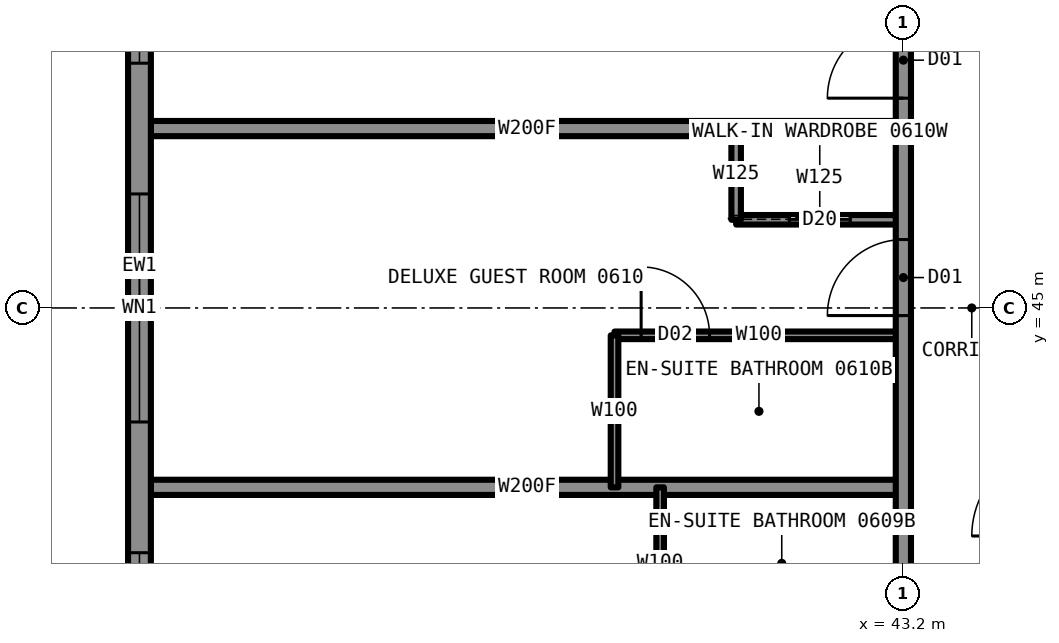
"""IFC4 building model, lengths in metres.
Left out: names, types, materials, properties, quantities, classifications, styles, units other than length and angle.
Written with IfcOpenShell. Run it as: python <this file> out.ifc"""

import sys

from ifc_helpers import new_model, si_unit, direction, frame, frame_2d, origin, place, context, subcontext, project, spatial, rectangle, extrude, element, fill, save


model = new_model("IFC4")
c1 = context("Model", 3, precision=1e-05, world=origin(), true_north=direction((0.0, 1.0)))
c2 = subcontext(c1, "Body", "Model", "MODEL_VIEW")
j1 = project(units=[si_unit("LENGTHUNIT", "METRE"), si_unit("PLANEANGLEUNIT", "RADIAN")], contexts=[c1])
p1 = place(None, origin())
s1 = spatial("IfcSite", under=j1, at=p1, CompositionType="ELEMENT")
p2 = place(p1, origin())
s2 = spatial("IfcBuilding", under=s1, at=p2, CompositionType="ELEMENT")
p3 = place(p2, frame((0.0, 0.0, 28.5)))
s3 = spatial("IfcBuildingStorey", under=s2, at=p3, CompositionType="ELEMENT", Elevation=28.5)
p4 = place(p3, frame((39.4, 44.64, 0.0), z_axis=(0.0, 0.0, 1.0), x_axis=(1.0, 0.0, 0.0)))
e1 = element("IfcWall", 1, at=p4, inside=s3, PredefinedType="PARTITIONING", context=c2, shape_type="SweptSolid", body=[
    extrude(rectangle(XDim=3.8, YDim=0.1, at=frame_2d((1.9, 0.0))), origin(), (0.0, 0.0, 1.0), 3.33),
])
p5 = place(p4, frame((0.35, 0.0, 0.0)))
e2 = element("IfcOpeningElement", 2, at=p5, cuts=e1, PredefinedType="OPENING", context=c2, shape_type="SweptSolid", body=[
    extrude(rectangle(XDim=0.9, YDim=2.1, at=frame_2d((0.45, 1.05))), frame((0.0, 0.06, 0.0), z_axis=(0.0, -1.0, 0.0), x_axis=(1.0, 0.0, 0.0)), (0.0, 0.0, 1.0), 0.12),
])
p6 = place(p3, frame((33.3, 42.64, 0.0), z_axis=(0.0, 0.0, 1.0), x_axis=(1.0, 0.0, 0.0)))
e3 = element("IfcWall", 3, at=p6, inside=s3, PredefinedType="PARTITIONING", context=c2, shape_type="SweptSolid", body=[
    extrude(rectangle(XDim=9.9, YDim=0.2, at=frame_2d((4.95, 0.0))), origin(), (0.0, 0.0, 1.0), 2.723),
])
p7 = place(p3, frame((41.0, 46.16, 0.0), z_axis=(0.0, 0.0, 1.0), x_axis=(1.0, 0.0, 0.0)))
e4 = element("IfcWall", 4, at=p7, inside=s3, PredefinedType="PARTITIONING", context=c2, shape_type="SweptSolid", body=[
    extrude(rectangle(XDim=2.2, YDim=0.125, at=frame_2d((1.1, 0.0))), origin(), (0.0, 0.0, 1.0), 3.33),
])
p8 = place(p7, frame((0.7, 0.0, 0.0)))
e5 = element("IfcOpeningElement", 5, at=p8, cuts=e4, PredefinedType="OPENING", context=c2, shape_type="SweptSolid", body=[
    extrude(rectangle(XDim=0.8, YDim=2.1, at=frame_2d((0.4, 1.05))), frame((0.0, 0.073, 0.0), z_axis=(0.0, -1.0, 0.0), x_axis=(1.0, 0.0, 0.0)), (0.0, 0.0, 1.0), 0.145),
])
p9 = place(p3, frame((33.3, 47.36, 0.0), z_axis=(0.0, 0.0, 1.0), x_axis=(1.0, 0.0, 0.0)))
e6 = element("IfcWall", 6, at=p9, inside=s3, PredefinedType="PARTITIONING", context=c2, shape_type="SweptSolid", body=[
    extrude(rectangle(XDim=9.9, YDim=0.2, at=frame_2d((4.95, 0.0))), origin(), (0.0, 0.0, 1.0), 2.723),
])
p10 = place(p3, frame((43.2, 33.22, 0.0), z_axis=(0.0, 0.0, 1.0), x_axis=(0.0, 1.0, 0.0)))
e7 = element("IfcWall", 7, at=p10, inside=s3, PredefinedType="PARTITIONING", context=c2, shape_type="SweptSolid", body=[
    extrude(rectangle(XDim=23.56, YDim=0.2, at=frame_2d((11.78, 0.0))), origin(), (0.0, 0.0, 1.0), 3.33),
])
p11 = place(p10, frame((6.16, 0.0, 0.0)))
e8 = element("IfcOpeningElement", 8, at=p11, cuts=e7, PredefinedType="OPENING", context=c2, shape_type="SweptSolid", body=[
    extrude(rectangle(XDim=1.0, YDim=2.2, at=frame_2d((0.5, 1.1))), frame((0.0, 0.11, 0.0), z_axis=(0.0, -1.0, 0.0), x_axis=(1.0, 0.0, 0.0)), (0.0, 0.0, 1.0), 0.22),
])
p12 = place(p10, frame((11.68, 0.0, 0.0)))
e9 = element("IfcOpeningElement", 9, at=p12, cuts=e7, PredefinedType="OPENING", context=c2, shape_type="SweptSolid", body=[
    extrude(rectangle(XDim=1.0, YDim=2.2, at=frame_2d((0.5, 1.1))), frame((0.0, 0.11, 0.0), z_axis=(0.0, -1.0, 0.0), x_axis=(1.0, 0.0, 0.0)), (0.0, 0.0, 1.0), 0.22),
])
p13 = place(p10, frame((14.54, 0.0, 0.0)))
e10 = element("IfcOpeningElement", 10, at=p13, cuts=e7, PredefinedType="OPENING", context=c2, shape_type="SweptSolid", body=[
    extrude(rectangle(XDim=1.0, YDim=2.2, at=frame_2d((0.5, 1.1))), frame((0.0, 0.11, 0.0), z_axis=(0.0, -1.0, 0.0), x_axis=(1.0, 0.0, 0.0)), (0.0, 0.0, 1.0), 0.22),
])
p14 = place(p10, frame((21.83, 0.0, 0.0)))
e11 = element("IfcOpeningElement", 11, at=p14, cuts=e7, PredefinedType="OPENING", context=c2, shape_type="SweptSolid", body=[
    extrude(rectangle(XDim=1.1, YDim=2.2, at=frame_2d((0.55, 1.1))), frame((0.0, 0.11, 0.0), z_axis=(0.0, -1.0, 0.0), x_axis=(1.0, 0.0, 0.0)), (0.0, 0.0, 1.0), 0.22),
])
p15 = place(p10, frame((0.63, 0.0, 0.0)))
e12 = element("IfcOpeningElement", 12, at=p15, cuts=e7, PredefinedType="OPENING", context=c2, shape_type="SweptSolid", body=[
    extrude(rectangle(XDim=1.1, YDim=2.2, at=frame_2d((0.55, 1.1))), frame((0.0, 0.11, 0.0), z_axis=(0.0, -1.0, 0.0), x_axis=(1.0, 0.0, 0.0)), (0.0, 0.0, 1.0), 0.22),
])
p16 = place(p3, frame((41.0, 46.16, 0.0), z_axis=(0.0, 0.0, 1.0), x_axis=(0.0, 1.0, 0.0)))
e13 = element("IfcWall", 13, at=p16, inside=s3, PredefinedType="PARTITIONING", context=c2, shape_type="SweptSolid", body=[
    extrude(rectangle(XDim=1.2, YDim=0.125, at=frame_2d((0.6, 0.0))), origin(), (0.0, 0.0, 1.0), 3.33),
])
for number, where, z_axis, x_axis in (
    (14, (40.0, 40.64, 0.0), (0.0, 0.0, 1.0), (0.0, 1.0, 0.0)),
    (15, (39.4, 42.64, 0.0), (0.0, 0.0, 1.0), (0.0, 1.0, 0.0)),
):
    element("IfcWall", number, at=place(p3, frame(where, z_axis=z_axis, x_axis=x_axis)), inside=s3, PredefinedType="PARTITIONING", context=c2, shape_type="SweptSolid", body=[
        extrude(rectangle(XDim=2.0, YDim=0.1, at=frame_2d((1.0, 0.0))), origin(), (0.0, 0.0, 1.0), 3.33),
    ])
p17 = place(p3, frame((33.15, 61.5, 0.0), z_axis=(0.0, 0.0, 1.0), x_axis=(0.0, -1.0, 0.0)))
e16 = element("IfcWall", 16, at=p17, inside=s3, PredefinedType="SOLIDWALL", context=c2, shape_type="SweptSolid", body=[
    extrude(rectangle(XDim=33.0, YDim=0.3, at=frame_2d((16.5, 0.0))), origin(), (0.0, 0.0, 1.0), 2.83),
])
p18 = place(p17, frame((0.85, 0.0, 0.5)))
e17 = element("IfcOpeningElement", 17, at=p18, cuts=e16, PredefinedType="OPENING", context=c2, shape_type="SweptSolid", body=[
    extrude(rectangle(XDim=3.0, YDim=2.0, at=frame_2d((1.5, 1.0))), frame((0.0, 0.16, 0.0), z_axis=(0.0, -1.0, 0.0), x_axis=(1.0, 0.0, 0.0)), (0.0, 0.0, 1.0), 0.32),
])
p19 = place(p17, frame((5.56, 0.0, 0.5)))
e18 = element("IfcOpeningElement", 18, at=p19, cuts=e16, PredefinedType="OPENING", context=c2, shape_type="SweptSolid", body=[
    extrude(rectangle(XDim=3.0, YDim=2.0, at=frame_2d((1.5, 1.0))), frame((0.0, 0.16, 0.0), z_axis=(0.0, -1.0, 0.0), x_axis=(1.0, 0.0, 0.0)), (0.0, 0.0, 1.0), 0.32),
])
p20 = place(p17, frame((10.28, 0.0, 0.5)))
e19 = element("IfcOpeningElement", 19, at=p20, cuts=e16, PredefinedType="OPENING", context=c2, shape_type="SweptSolid", body=[
    extrude(rectangle(XDim=3.0, YDim=2.0, at=frame_2d((1.5, 1.0))), frame((0.0, 0.16, 0.0), z_axis=(0.0, -1.0, 0.0), x_axis=(1.0, 0.0, 0.0)), (0.0, 0.0, 1.0), 0.32),
])
p21 = place(p17, frame((15.0, 0.0, 0.5)))
e20 = element("IfcOpeningElement", 20, at=p21, cuts=e16, PredefinedType="OPENING", context=c2, shape_type="SweptSolid", body=[
    extrude(rectangle(XDim=3.0, YDim=2.0, at=frame_2d((1.5, 1.0))), frame((0.0, 0.16, 0.0), z_axis=(0.0, -1.0, 0.0), x_axis=(1.0, 0.0, 0.0)), (0.0, 0.0, 1.0), 0.32),
])
p22 = place(p17, frame((19.72, 0.0, 0.5)))
e21 = element("IfcOpeningElement", 21, at=p22, cuts=e16, PredefinedType="OPENING", context=c2, shape_type="SweptSolid", body=[
    extrude(rectangle(XDim=3.0, YDim=2.0, at=frame_2d((1.5, 1.0))), frame((0.0, 0.16, 0.0), z_axis=(0.0, -1.0, 0.0), x_axis=(1.0, 0.0, 0.0)), (0.0, 0.0, 1.0), 0.32),
])
p23 = place(p17, frame((24.44, 0.0, 0.5)))
e22 = element("IfcOpeningElement", 22, at=p23, cuts=e16, PredefinedType="OPENING", context=c2, shape_type="SweptSolid", body=[
    extrude(rectangle(XDim=3.0, YDim=2.0, at=frame_2d((1.5, 1.0))), frame((0.0, 0.16, 0.0), z_axis=(0.0, -1.0, 0.0), x_axis=(1.0, 0.0, 0.0)), (0.0, 0.0, 1.0), 0.32),
])
p24 = place(p17, frame((29.15, 0.0, 0.5)))
e23 = element("IfcOpeningElement", 23, at=p24, cuts=e16, PredefinedType="OPENING", context=c2, shape_type="SweptSolid", body=[
    extrude(rectangle(XDim=3.0, YDim=2.0, at=frame_2d((1.5, 1.0))), frame((0.0, 0.16, 0.0), z_axis=(0.0, -1.0, 0.0), x_axis=(1.0, 0.0, 0.0)), (0.0, 0.0, 1.0), 0.32),
])
p25 = place(p12, origin())
e24 = element("IfcDoor", 24, at=p25, inside=s3, OperationType="SINGLE_SWING_LEFT", PredefinedType="DOOR", context=c2, shape_type="SweptSolid", body=[
    extrude(rectangle(XDim=1.0, YDim=2.2, at=frame_2d((0.5, 1.1))), frame((0.0, 0.025, 0.0), z_axis=(0.0, -1.0, 0.0), x_axis=(1.0, 0.0, 0.0)), (0.0, 0.0, 1.0), 0.05),
])
fill(e9, e24)
p26 = place(p5, origin())
e25 = element("IfcDoor", 25, at=p26, inside=s3, OperationType="SINGLE_SWING_RIGHT", PredefinedType="DOOR", context=c2, shape_type="SweptSolid", body=[
    extrude(rectangle(XDim=0.9, YDim=2.1, at=frame_2d((0.45, 1.05))), frame((0.0, 0.025, 0.0), z_axis=(0.0, -1.0, 0.0), x_axis=(1.0, 0.0, 0.0)), (0.0, 0.0, 1.0), 0.05),
])
fill(e2, e25)
p27 = place(p8, origin())
e26 = element("IfcDoor", 26, at=p27, inside=s3, OperationType="SLIDING_TO_LEFT", PredefinedType="DOOR", context=c2, shape_type="SweptSolid", body=[
    extrude(rectangle(XDim=0.8, YDim=2.1, at=frame_2d((0.4, 1.05))), frame((0.0, 0.025, 0.0), z_axis=(0.0, -1.0, 0.0), x_axis=(1.0, 0.0, 0.0)), (0.0, 0.0, 1.0), 0.05),
])
fill(e5, e26)
p28 = place(p13, origin())
e27 = element("IfcDoor", 27, at=p28, inside=s3, OperationType="SINGLE_SWING_LEFT", PredefinedType="DOOR", context=c2, shape_type="SweptSolid", body=[
    extrude(rectangle(XDim=1.0, YDim=2.2, at=frame_2d((0.5, 1.1))), frame((0.0, 0.025, 0.0), z_axis=(0.0, -1.0, 0.0), x_axis=(1.0, 0.0, 0.0)), (0.0, 0.0, 1.0), 0.05),
])
fill(e10, e27)
p29 = place(p20, origin())
e28 = element("IfcWindow", 28, at=p29, inside=s3, PartitioningType="SINGLE_PANEL", PredefinedType="WINDOW", context=c2, shape_type="SweptSolid", body=[
    extrude(rectangle(XDim=3.0, YDim=2.0, at=frame_2d((1.5, 1.0))), frame((0.0, 0.03, 0.0), z_axis=(0.0, -1.0, 0.0), x_axis=(1.0, 0.0, 0.0)), (0.0, 0.0, 1.0), 0.06),
])
fill(e19, e28)
p30 = place(p21, origin())
e29 = element("IfcWindow", 29, at=p30, inside=s3, PartitioningType="SINGLE_PANEL", PredefinedType="WINDOW", context=c2, shape_type="SweptSolid", body=[
    extrude(rectangle(XDim=3.0, YDim=2.0, at=frame_2d((1.5, 1.0))), frame((0.0, 0.03, 0.0), z_axis=(0.0, -1.0, 0.0), x_axis=(1.0, 0.0, 0.0)), (0.0, 0.0, 1.0), 0.06),
])
fill(e20, e29)
p31 = place(p22, origin())
e30 = element("IfcWindow", 30, at=p31, inside=s3, PartitioningType="SINGLE_PANEL", PredefinedType="WINDOW", context=c2, shape_type="SweptSolid", body=[
    extrude(rectangle(XDim=3.0, YDim=2.0, at=frame_2d((1.5, 1.0))), frame((0.0, 0.03, 0.0), z_axis=(0.0, -1.0, 0.0), x_axis=(1.0, 0.0, 0.0)), (0.0, 0.0, 1.0), 0.06),
])
fill(e21, e30)
save(model, sys.argv[1])
